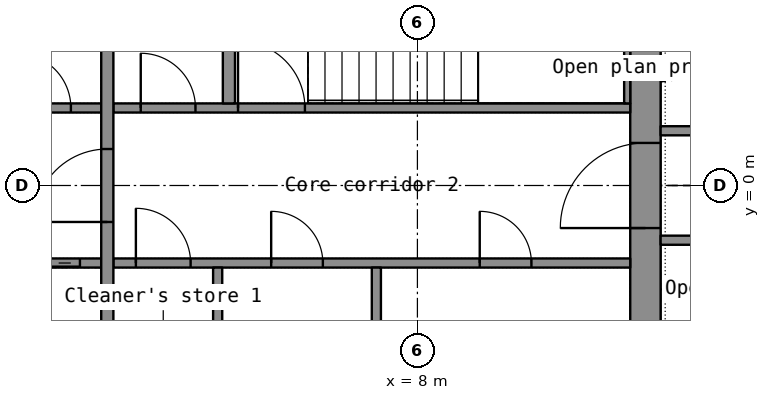
"""IFC4 building model, lengths in metres.
Left out: names, types, materials, properties, quantities, classifications, styles, units other than length and angle.
Written with IfcOpenShell. Run it as: python <this file> out.ifc"""

import sys

from ifc_helpers import new_model, si_unit, direction, frame, frame_2d, origin, place, context, subcontext, project, spatial, rectangle, extrude, element, fill, save


model = new_model("IFC4")
c1 = context("Model", 3, precision=1e-05, world=origin(), true_north=direction((0.0, 1.0)))
c2 = subcontext(c1, "Body", "Model", "MODEL_VIEW")
j1 = project(units=[si_unit("LENGTHUNIT", "METRE"), si_unit("PLANEANGLEUNIT", "RADIAN")], contexts=[c1])
p1 = place(None, origin())
s1 = spatial("IfcSite", under=j1, at=p1, CompositionType="ELEMENT")
p2 = place(p1, origin())
s2 = spatial("IfcBuilding", under=s1, at=p2, CompositionType="ELEMENT")
p3 = place(p2, frame((0.0, 0.0, 137.8)))
s3 = spatial("IfcBuildingStorey", under=s2, at=p3, CompositionType="ELEMENT", Elevation=137.8)
p4 = place(p3, frame((11.75, -7.2, 0.0), z_axis=(0.0, 0.0, 1.0), x_axis=(0.0, 1.0, 0.0)))
e1 = element("IfcWall", 1, at=p4, inside=s3, PredefinedType="SHEAR", context=c2, shape_type="SweptSolid", body=[
    extrude(rectangle(XDim=14.4, YDim=0.5, at=frame_2d((7.2, 0.0))), origin(), (0.0, 0.0, 1.0), 3.3),
])
p5 = place(p4, frame((6.5, 0.0, 0.0)))
e2 = element("IfcOpeningElement", 2, at=p5, cuts=e1, PredefinedType="OPENING", context=c2, shape_type="SweptSolid", body=[
    extrude(rectangle(XDim=1.4, YDim=2.2, at=frame_2d((0.7, 1.1))), frame((0.0, 0.26, 0.0), z_axis=(0.0, -1.0, 0.0), x_axis=(1.0, 0.0, 0.0)), (0.0, 0.0, 1.0), 0.52),
])
p6 = place(p3, frame((-2.8, -1.275, 0.0), z_axis=(0.0, 0.0, 1.0), x_axis=(1.0, 0.0, 0.0)))
e3 = element("IfcWall", 3, at=p6, inside=s3, PredefinedType="SHEAR", context=c2, shape_type="SweptSolid", body=[
    extrude(rectangle(XDim=5.6, YDim=0.15, at=frame_2d((2.8, 0.0))), origin(), (0.0, 0.0, 1.0), 3.3),
])
p7 = place(p6, frame((4.15, 0.0, 0.0)))
e4 = element("IfcOpeningElement", 4, at=p7, cuts=e3, PredefinedType="OPENING", context=c2, shape_type="SweptSolid", body=[
    extrude(rectangle(XDim=1.1, YDim=2.2, at=frame_2d((0.55, 1.1))), frame((0.0, 0.085, 0.0), z_axis=(0.0, -1.0, 0.0), x_axis=(1.0, 0.0, 0.0)), (0.0, 0.0, 1.0), 0.17),
])
p8 = place(p6, frame((1.35, 0.0, 0.0)))
e5 = element("IfcOpeningElement", 5, at=p8, cuts=e3, PredefinedType="OPENING", context=c2, shape_type="SweptSolid", body=[
    extrude(rectangle(XDim=0.9, YDim=2.1, at=frame_2d((0.45, 1.05))), frame((0.0, 0.085, 0.0), z_axis=(0.0, -1.0, 0.0), x_axis=(1.0, 0.0, 0.0)), (0.0, 0.0, 1.0), 0.17),
])
p9 = place(p3, frame((3.0, -1.275, 0.0), z_axis=(0.0, 0.0, 1.0), x_axis=(1.0, 0.0, 0.0)))
e6 = element("IfcWall", 6, at=p9, inside=s3, PredefinedType="PARTITIONING", context=c2, shape_type="SweptSolid", body=[
    extrude(rectangle(XDim=8.5, YDim=0.15, at=frame_2d((4.25, 0.0))), origin(), (0.0, 0.0, 1.0), 3.3),
])
p10 = place(p9, frame((0.37, 0.0, 0.0)))
e7 = element("IfcOpeningElement", 7, at=p10, cuts=e6, PredefinedType="OPENING", context=c2, shape_type="SweptSolid", body=[
    extrude(rectangle(XDim=0.9, YDim=2.1, at=frame_2d((0.45, 1.05))), frame((0.0, 0.085, 0.0), z_axis=(0.0, -1.0, 0.0), x_axis=(1.0, 0.0, 0.0)), (0.0, 0.0, 1.0), 0.17),
])
p11 = place(p9, frame((2.595, 0.0, 0.0)))
e8 = element("IfcOpeningElement", 8, at=p11, cuts=e6, PredefinedType="OPENING", context=c2, shape_type="SweptSolid", body=[
    extrude(rectangle(XDim=0.85, YDim=2.1, at=frame_2d((0.425, 1.05))), frame((0.0, 0.085, 0.0), z_axis=(0.0, -1.0, 0.0), x_axis=(1.0, 0.0, 0.0)), (0.0, 0.0, 1.0), 0.17),
])
p12 = place(p9, frame((6.025, 0.0, 0.0)))
e9 = element("IfcOpeningElement", 9, at=p12, cuts=e6, PredefinedType="OPENING", context=c2, shape_type="SweptSolid", body=[
    extrude(rectangle(XDim=0.85, YDim=2.1, at=frame_2d((0.425, 1.05))), frame((0.0, 0.085, 0.0), z_axis=(0.0, -1.0, 0.0), x_axis=(1.0, 0.0, 0.0)), (0.0, 0.0, 1.0), 0.17),
])
p13 = place(p3, frame((-2.8, 1.275, 0.0), z_axis=(0.0, 0.0, 1.0), x_axis=(1.0, 0.0, 0.0)))
e10 = element("IfcWall", 10, at=p13, inside=s3, PredefinedType="SHEAR", context=c2, shape_type="SweptSolid", body=[
    extrude(rectangle(XDim=5.6, YDim=0.15, at=frame_2d((2.8, 0.0))), origin(), (0.0, 0.0, 1.0), 3.3),
])
p14 = place(p13, frame((0.35, 0.0, 0.0)))
e11 = element("IfcOpeningElement", 11, at=p14, cuts=e10, PredefinedType="OPENING", context=c2, shape_type="SweptSolid", body=[
    extrude(rectangle(XDim=1.1, YDim=2.2, at=frame_2d((0.55, 1.1))), frame((0.0, 0.085, 0.0), z_axis=(0.0, -1.0, 0.0), x_axis=(1.0, 0.0, 0.0)), (0.0, 0.0, 1.0), 0.17),
])
p15 = place(p13, frame((2.326, 0.0, 0.0)))
e12 = element("IfcOpeningElement", 12, at=p15, cuts=e10, PredefinedType="OPENING", context=c2, shape_type="SweptSolid", body=[
    extrude(rectangle(XDim=0.9, YDim=2.1, at=frame_2d((0.45, 1.05))), frame((0.0, 0.085, 0.0), z_axis=(0.0, -1.0, 0.0), x_axis=(1.0, 0.0, 0.0)), (0.0, 0.0, 1.0), 0.17),
])
p16 = place(p13, frame((4.201, 0.0, 0.0)))
e13 = element("IfcOpeningElement", 13, at=p16, cuts=e10, PredefinedType="OPENING", context=c2, shape_type="SweptSolid", body=[
    extrude(rectangle(XDim=0.9, YDim=2.1, at=frame_2d((0.45, 1.05))), frame((0.0, 0.085, 0.0), z_axis=(0.0, -1.0, 0.0), x_axis=(1.0, 0.0, 0.0)), (0.0, 0.0, 1.0), 0.17),
])
p17 = place(p3, frame((3.0, 1.275, 0.0), z_axis=(0.0, 0.0, 1.0), x_axis=(1.0, 0.0, 0.0)))
e14 = element("IfcWall", 14, at=p17, inside=s3, PredefinedType="SHEAR", context=c2, shape_type="SweptSolid", body=[
    extrude(rectangle(XDim=8.5, YDim=0.15, at=frame_2d((4.25, 0.0))), origin(), (0.0, 0.0, 1.0), 3.3),
])
p18 = place(p17, frame((2.05, 0.0, 0.0)))
e15 = element("IfcOpeningElement", 15, at=p18, cuts=e14, PredefinedType="OPENING", context=c2, shape_type="SweptSolid", body=[
    extrude(rectangle(XDim=1.1, YDim=2.15, at=frame_2d((0.55, 1.075))), frame((0.0, 0.085, 0.0), z_axis=(0.0, -1.0, 0.0), x_axis=(1.0, 0.0, 0.0)), (0.0, 0.0, 1.0), 0.17),
])
p19 = place(p17, frame((0.45, 0.0, 0.0)))
e16 = element("IfcOpeningElement", 16, at=p19, cuts=e14, PredefinedType="OPENING", context=c2, shape_type="SweptSolid", body=[
    extrude(rectangle(XDim=0.9, YDim=2.1, at=frame_2d((0.45, 1.05))), frame((0.0, 0.085, 0.0), z_axis=(0.0, -1.0, 0.0), x_axis=(1.0, 0.0, 0.0)), (0.0, 0.0, 1.0), 0.17),
])
p20 = place(p3, frame((2.9, -3.7, 0.0), z_axis=(0.0, 0.0, 1.0), x_axis=(0.0, 1.0, 0.0)))
e17 = element("IfcWall", 17, at=p20, inside=s3, PredefinedType="SHEAR", context=c2, shape_type="SweptSolid", body=[
    extrude(rectangle(XDim=7.4, YDim=0.2, at=frame_2d((3.7, 0.0))), origin(), (0.0, 0.0, 1.0), 3.3),
])
p21 = place(p20, frame((3.1, 0.0, 0.0)))
e18 = element("IfcOpeningElement", 18, at=p21, cuts=e17, PredefinedType="OPENING", context=c2, shape_type="SweptSolid", body=[
    extrude(rectangle(XDim=1.2, YDim=2.2, at=frame_2d((0.6, 1.1))), frame((0.0, 0.11, 0.0), z_axis=(0.0, -1.0, 0.0), x_axis=(1.0, 0.0, 0.0)), (0.0, 0.0, 1.0), 0.22),
])
p22 = place(p3, frame((11.45, 1.35, 0.0), z_axis=(0.0, 0.0, 1.0), x_axis=(0.0, 1.0, 0.0)))
e19 = element("IfcWall", 19, at=p22, inside=s3, PredefinedType="SHEAR", context=c2, shape_type="SweptSolid", body=[
    extrude(rectangle(XDim=2.35, YDim=0.1, at=frame_2d((1.175, 0.0))), origin(), (0.0, 0.0, 1.0), 3.3),
])
p23 = place(p3, frame((4.9, 1.35, 0.0), z_axis=(0.0, 0.0, 1.0), x_axis=(0.0, 1.0, 0.0)))
e20 = element("IfcWall", 20, at=p23, inside=s3, PredefinedType="SHEAR", context=c2, shape_type="SweptSolid", body=[
    extrude(rectangle(XDim=2.35, YDim=0.2, at=frame_2d((1.175, 0.0))), origin(), (0.0, 0.0, 1.0), 3.3),
])
for number, where, z_axis, x_axis in (
    (21, (4.715, -3.7, 0.0), (0.0, 0.0, 1.0), (0.0, 1.0, 0.0)),
    (22, (7.325, -3.7, 0.0), (0.0, 0.0, 1.0), (0.0, 1.0, 0.0)),
):
    element("IfcWall", number, at=place(p3, frame(where, z_axis=z_axis, x_axis=x_axis)), inside=s3, PredefinedType="PARTITIONING", context=c2, shape_type="SweptSolid", body=[
        extrude(rectangle(XDim=2.35, YDim=0.15, at=frame_2d((1.175, 0.0))), origin(), (0.0, 0.0, 1.0), 3.3),
    ])
p24 = place(p3, frame((12.0, -0.9, 0.0), z_axis=(0.0, 0.0, 1.0), x_axis=(1.0, 0.0, 0.0)))
e23 = element("IfcWall", 23, at=p24, inside=s3, PredefinedType="PARTITIONING", context=c2, shape_type="SweptSolid", body=[
    extrude(rectangle(XDim=4.0, YDim=0.15, at=frame_2d((2.0, 0.0))), origin(), (0.0, 0.0, 1.0), 2.4),
])
p25 = place(p24, frame((1.4, 0.0, 0.0)))
e24 = element("IfcOpeningElement", 24, at=p25, cuts=e23, PredefinedType="OPENING", context=c2, shape_type="SweptSolid", body=[
    extrude(rectangle(XDim=1.2, YDim=2.2, at=frame_2d((0.6, 1.1))), frame((0.0, 0.085, 0.0), z_axis=(0.0, -1.0, 0.0), x_axis=(1.0, 0.0, 0.0)), (0.0, 0.0, 1.0), 0.17),
])
p26 = place(p3, frame((15.923, 0.9, 0.0), z_axis=(0.0, 0.0, 1.0), x_axis=(-1.0, 0.0, 0.0)))
e25 = element("IfcWall", 25, at=p26, inside=s3, PredefinedType="PARTITIONING", context=c2, shape_type="SweptSolid", body=[
    extrude(rectangle(XDim=3.923, YDim=0.15, at=frame_2d((1.961, 0.0))), origin(), (0.0, 0.0, 1.0), 2.4),
])
p27 = place(p5, origin())
e26 = element("IfcDoor", 26, at=p27, inside=s3, OperationType="DOUBLE_DOOR_SINGLE_SWING", PredefinedType="DOOR", context=c2, shape_type="SweptSolid", body=[
    extrude(rectangle(XDim=1.4, YDim=2.2, at=frame_2d((0.7, 1.1))), frame((0.0, 0.025, 0.0), z_axis=(0.0, -1.0, 0.0), x_axis=(1.0, 0.0, 0.0)), (0.0, 0.0, 1.0), 0.05),
])
fill(e2, e26)
p28 = place(p21, origin())
e27 = element("IfcDoor", 27, at=p28, inside=s3, OperationType="SINGLE_SWING_LEFT", PredefinedType="DOOR", context=c2, shape_type="SweptSolid", body=[
    extrude(rectangle(XDim=1.2, YDim=2.2, at=frame_2d((0.6, 1.1))), frame((0.0, 0.025, 0.0), z_axis=(0.0, -1.0, 0.0), x_axis=(1.0, 0.0, 0.0)), (0.0, 0.0, 1.0), 0.05),
])
fill(e18, e27)
p29 = place(p7, origin())
e28 = element("IfcDoor", 28, at=p29, inside=s3, OperationType="DOUBLE_DOOR_SLIDING", PredefinedType="DOOR", context=c2, shape_type="SweptSolid", body=[
    extrude(rectangle(XDim=1.1, YDim=2.2, at=frame_2d((0.55, 1.1))), frame((0.0, 0.025, 0.0), z_axis=(0.0, -1.0, 0.0), x_axis=(1.0, 0.0, 0.0)), (0.0, 0.0, 1.0), 0.05),
])
fill(e4, e28)
p30 = place(p18, origin())
e29 = element("IfcDoor", 29, at=p30, inside=s3, OperationType="SINGLE_SWING_LEFT", PredefinedType="DOOR", context=c2, shape_type="SweptSolid", body=[
    extrude(rectangle(XDim=1.1, YDim=2.15, at=frame_2d((0.55, 1.075))), frame((0.0, 0.025, 0.0), z_axis=(0.0, -1.0, 0.0), x_axis=(1.0, 0.0, 0.0)), (0.0, 0.0, 1.0), 0.05),
])
fill(e15, e29)
p31 = place(p10, origin())
e30 = element("IfcDoor", 30, at=p31, inside=s3, OperationType="SINGLE_SWING_LEFT", PredefinedType="DOOR", context=c2, shape_type="SweptSolid", body=[
    extrude(rectangle(XDim=0.9, YDim=2.1, at=frame_2d((0.45, 1.05))), frame((0.0, 0.025, 0.0), z_axis=(0.0, -1.0, 0.0), x_axis=(1.0, 0.0, 0.0)), (0.0, 0.0, 1.0), 0.05),
])
fill(e7, e30)
p32 = place(p11, origin())
e31 = element("IfcDoor", 31, at=p32, inside=s3, OperationType="SINGLE_SWING_LEFT", PredefinedType="DOOR", context=c2, shape_type="SweptSolid", body=[
    extrude(rectangle(XDim=0.85, YDim=2.1, at=frame_2d((0.425, 1.05))), frame((0.0, 0.025, 0.0), z_axis=(0.0, -1.0, 0.0), x_axis=(1.0, 0.0, 0.0)), (0.0, 0.0, 1.0), 0.05),
])
fill(e8, e31)
p33 = place(p12, origin())
e32 = element("IfcDoor", 32, at=p33, inside=s3, OperationType="SINGLE_SWING_LEFT", PredefinedType="DOOR", context=c2, shape_type="SweptSolid", body=[
    extrude(rectangle(XDim=0.85, YDim=2.1, at=frame_2d((0.425, 1.05))), frame((0.0, 0.025, 0.0), z_axis=(0.0, -1.0, 0.0), x_axis=(1.0, 0.0, 0.0)), (0.0, 0.0, 1.0), 0.05),
])
fill(e9, e32)
p34 = place(p16, origin())
e33 = element("IfcDoor", 33, at=p34, inside=s3, OperationType="SINGLE_SWING_LEFT", PredefinedType="DOOR", context=c2, shape_type="SweptSolid", body=[
    extrude(rectangle(XDim=0.9, YDim=2.1, at=frame_2d((0.45, 1.05))), frame((0.0, 0.025, 0.0), z_axis=(0.0, -1.0, 0.0), x_axis=(1.0, 0.0, 0.0)), (0.0, 0.0, 1.0), 0.05),
])
fill(e13, e33)
p35 = place(p19, origin())
e34 = element("IfcDoor", 34, at=p35, inside=s3, OperationType="SINGLE_SWING_LEFT", PredefinedType="DOOR", context=c2, shape_type="SweptSolid", body=[
    extrude(rectangle(XDim=0.9, YDim=2.1, at=frame_2d((0.45, 1.05))), frame((0.0, 0.025, 0.0), z_axis=(0.0, -1.0, 0.0), x_axis=(1.0, 0.0, 0.0)), (0.0, 0.0, 1.0), 0.05),
])
fill(e16, e34)
save(model, sys.argv[1])
